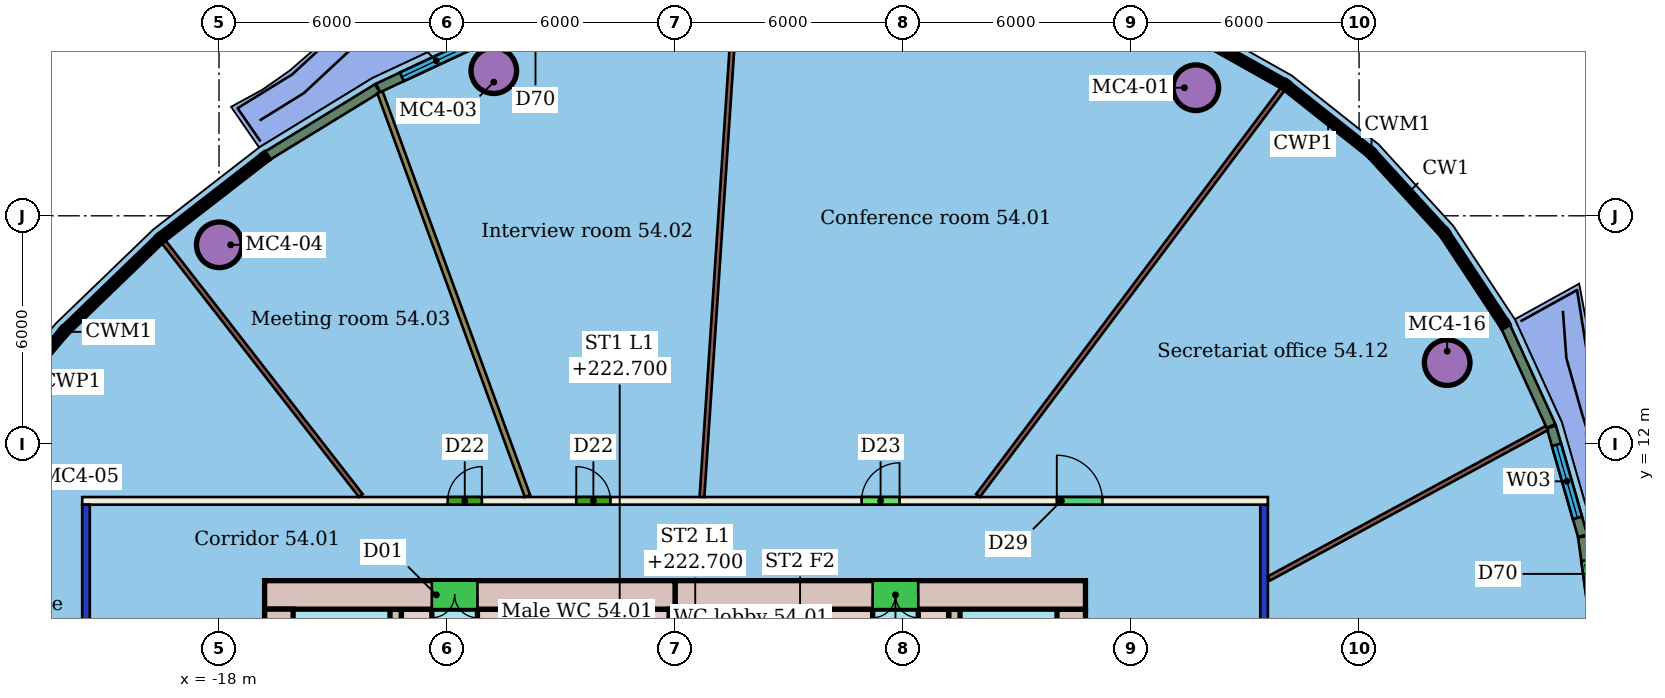
"""IFC4 building model, lengths in metres.
Left out: names, types, materials, properties, quantities, classifications, styles, units other than length and angle.
Written with IfcOpenShell. Run it as: python <this file> out.ifc"""

import sys

from ifc_helpers import new_model, si_unit, direction, frame, frame_2d, origin, origin_2d, place, context, subcontext, project, spatial, rectangle, hollow_circle, extrude, element, fill, save


model = new_model("IFC4")
c1 = context("Model", 3, precision=1e-05, world=origin(), true_north=direction((0.0, 1.0)))
c2 = subcontext(c1, "Body", "Model", "MODEL_VIEW")
j1 = project(units=[si_unit("LENGTHUNIT", "METRE"), si_unit("PLANEANGLEUNIT", "RADIAN")], contexts=[c1])
p1 = place(None, origin())
s1 = spatial("IfcSite", under=j1, at=p1, CompositionType="ELEMENT")
p2 = place(p1, origin())
s2 = spatial("IfcBuilding", under=s1, at=p2, CompositionType="ELEMENT")
p3 = place(p2, frame((0.0, 0.0, 220.9)))
s3 = spatial("IfcBuildingStorey", under=s2, at=p3, CompositionType="ELEMENT", Elevation=220.9)
for number, where, z_axis, x_axis in (
    (1, (7.704, 21.37, 0.0), (0.0, 0.0, 1.0), (1.0, 0.0, 0.0)),
    (2, (-10.769, 21.819, 0.0), (0.0, 0.0, 1.0), (1.0, 0.0, 0.0)),
    (3, (-17.993, 17.237, 0.0), (0.0, 0.0, 1.0), (1.0, 0.0, 0.0)),
    (4, (14.318, 14.137, 0.0), (0.0, 0.0, 1.0), (1.0, 0.0, 0.0)),
):
    element("IfcColumn", number, at=place(p3, frame(where, z_axis=z_axis, x_axis=x_axis)), inside=s3, PredefinedType="COLUMN", context=c2, shape_type="SweptSolid", body=[
        extrude(hollow_circle(Radius=0.6, WallThickness=0.045, at=origin_2d()), origin(), (0.0, 0.0, 1.0), 3.45),
    ])
p4 = place(p3, frame((-21.5, -10.4, 0.0), z_axis=(0.0, 0.0, 1.0), x_axis=(0.0, 1.0, 0.0)))
e5 = element("IfcWall", 5, at=p4, inside=s3, PredefinedType="PARTITIONING", context=c2, shape_type="SweptSolid", body=[
    extrude(rectangle(XDim=20.8, YDim=0.2, at=frame_2d((10.4, 0.0))), origin(), (0.0, 0.0, 1.0), 3.05),
])
p5 = place(p4, frame((13.413, 0.0, 0.0)))
e6 = element("IfcOpeningElement", 6, at=p5, cuts=e5, PredefinedType="OPENING", context=c2, shape_type="SweptSolid", body=[
    extrude(rectangle(XDim=1.0, YDim=2.4, at=frame_2d((0.5, 1.2))), frame((0.0, 0.11, 0.0), z_axis=(0.0, -1.0, 0.0), x_axis=(1.0, 0.0, 0.0)), (0.0, 0.0, 1.0), 0.22),
])
p6 = place(p4, frame((5.693, 0.0, 0.0)))
e7 = element("IfcOpeningElement", 7, at=p6, cuts=e5, PredefinedType="OPENING", context=c2, shape_type="SweptSolid", body=[
    extrude(rectangle(XDim=1.8, YDim=2.4, at=frame_2d((0.9, 1.2))), frame((0.0, 0.11, 0.0), z_axis=(0.0, -1.0, 0.0), x_axis=(1.0, 0.0, 0.0)), (0.0, 0.0, 1.0), 0.22),
])
p7 = place(p3, frame((-21.6, 10.5, 0.0), z_axis=(0.0, 0.0, 1.0), x_axis=(1.0, 0.0, 0.0)))
e8 = element("IfcWall", 8, at=p7, inside=s3, PredefinedType="PARTITIONING", context=c2, shape_type="SweptSolid", body=[
    extrude(rectangle(XDim=31.2, YDim=0.2, at=frame_2d((15.6, 0.0))), origin(), (0.0, 0.0, 1.0), 3.45),
])
p8 = place(p7, frame((20.509, 0.0, 0.0)))
e9 = element("IfcOpeningElement", 9, at=p8, cuts=e8, PredefinedType="OPENING", context=c2, shape_type="SweptSolid", body=[
    extrude(rectangle(XDim=1.0, YDim=2.4, at=frame_2d((0.5, 1.2))), frame((0.0, 0.11, 0.0), z_axis=(0.0, -1.0, 0.0), x_axis=(1.0, 0.0, 0.0)), (0.0, 0.0, 1.0), 0.22),
])
p9 = place(p7, frame((13.001, 0.0, 0.0)))
e10 = element("IfcOpeningElement", 10, at=p9, cuts=e8, PredefinedType="OPENING", context=c2, shape_type="SweptSolid", body=[
    extrude(rectangle(XDim=0.9, YDim=2.1, at=frame_2d((0.45, 1.05))), frame((0.0, 0.11, 0.0), z_axis=(0.0, -1.0, 0.0), x_axis=(1.0, 0.0, 0.0)), (0.0, 0.0, 1.0), 0.22),
])
p10 = place(p7, frame((9.617, 0.0, 0.0)))
e11 = element("IfcOpeningElement", 11, at=p10, cuts=e8, PredefinedType="OPENING", context=c2, shape_type="SweptSolid", body=[
    extrude(rectangle(XDim=0.9, YDim=2.1, at=frame_2d((0.45, 1.05))), frame((0.0, 0.11, 0.0), z_axis=(0.0, -1.0, 0.0), x_axis=(1.0, 0.0, 0.0)), (0.0, 0.0, 1.0), 0.22),
])
p11 = place(p7, frame((25.646, 0.0, 0.0)))
e12 = element("IfcOpeningElement", 12, at=p11, cuts=e8, PredefinedType="OPENING", context=c2, shape_type="SweptSolid", body=[
    extrude(rectangle(XDim=1.2, YDim=2.4, at=frame_2d((0.6, 1.2))), frame((0.0, 0.11, 0.0), z_axis=(0.0, -1.0, 0.0), x_axis=(1.0, 0.0, 0.0)), (0.0, 0.0, 1.0), 0.22),
])
p12 = place(p3, frame((9.5, 10.4, 0.0), z_axis=(0.0, 0.0, 1.0), x_axis=(0.0, -1.0, 0.0)))
e13 = element("IfcWall", 13, at=p12, inside=s3, PredefinedType="PARTITIONING", context=c2, shape_type="SweptSolid", body=[
    extrude(rectangle(XDim=20.8, YDim=0.2, at=frame_2d((10.4, 0.0))), origin(), (0.0, 0.0, 1.0), 3.05),
])
p13 = place(p12, frame((14.609, 0.0, 0.0)))
e14 = element("IfcOpeningElement", 14, at=p13, cuts=e13, PredefinedType="OPENING", context=c2, shape_type="SweptSolid", body=[
    extrude(rectangle(XDim=0.9, YDim=2.1, at=frame_2d((0.45, 1.05))), frame((0.0, 0.11, 0.0), z_axis=(0.0, -1.0, 0.0), x_axis=(1.0, 0.0, 0.0)), (0.0, 0.0, 1.0), 0.22),
])
p14 = place(p12, frame((6.585, 0.0, 0.0)))
e15 = element("IfcOpeningElement", 15, at=p14, cuts=e13, PredefinedType="OPENING", context=c2, shape_type="SweptSolid", body=[
    extrude(rectangle(XDim=1.5, YDim=2.1, at=frame_2d((0.75, 1.05))), frame((0.0, 0.11, 0.0), z_axis=(0.0, -1.0, 0.0), x_axis=(1.0, 0.0, 0.0)), (0.0, 0.0, 1.0), 0.22),
])
p15 = place(p3, frame((9.991, 21.337, 0.0), z_axis=(0.0, 0.0, 1.0), x_axis=(-0.599716591432, -0.800212478009, 0.0)))
e16 = element("IfcWall", 16, at=p15, inside=s3, PredefinedType="PARTITIONING", context=c2, shape_type="SweptSolid", body=[
    extrude(rectangle(XDim=13.371, YDim=0.125, at=frame_2d((6.686, 0.0))), origin(), (0.0, 0.0, 1.0), 3.45),
])
p16 = place(p3, frame((-4.372, 24.363, 0.0), z_axis=(0.0, 0.0, 1.0), x_axis=(-0.066675295354, -0.997774726574, 0.0)))
e17 = element("IfcWall", 17, at=p16, inside=s3, PredefinedType="PARTITIONING", context=c2, shape_type="SweptSolid", body=[
    extrude(rectangle(XDim=13.79, YDim=0.125, at=frame_2d((6.895, 0.0))), origin(), (0.0, 0.0, 1.0), 3.45),
])
p17 = place(p3, frame((-13.765, 21.249, 0.0), z_axis=(0.0, 0.0, 1.0), x_axis=(0.34323140515, -0.939250873046, 0.0)))
e18 = element("IfcWall", 18, at=p17, inside=s3, PredefinedType="PARTITIONING", context=c2, shape_type="SweptSolid", body=[
    extrude(rectangle(XDim=11.31, YDim=0.15, at=frame_2d((5.655, 0.0))), origin(), (0.0, 0.0, 1.0), 3.45),
])
p18 = place(p3, frame((-19.457, 17.314, 0.0), z_axis=(0.0, 0.0, 1.0), x_axis=(0.613674696521, -0.789558969837, 0.0)))
e19 = element("IfcWall", 19, at=p18, inside=s3, PredefinedType="PARTITIONING", context=c2, shape_type="SweptSolid", body=[
    extrude(rectangle(XDim=8.455, YDim=0.125, at=frame_2d((4.228, 0.0))), origin(), (0.0, 0.0, 1.0), 3.45),
])
p19 = place(p3, frame((16.939, 12.415, 0.0), z_axis=(0.0, 0.0, 1.0), x_axis=(-0.879463626067, -0.47596610218, 0.0)))
e20 = element("IfcWall", 20, at=p19, inside=s3, PredefinedType="PARTITIONING", context=c2, shape_type="SweptSolid", body=[
    extrude(rectangle(XDim=8.311, YDim=0.125, at=frame_2d((4.156, 0.0))), origin(), (0.0, 0.0, 1.0), 3.45),
])
p20 = place(p3, frame((-10.751, 22.794, 0.0), z_axis=(0.0, 0.0, 1.0), x_axis=(-0.906026245015, -0.42322150624, 0.0)))
e21 = element("IfcWall", 21, at=p20, inside=s3, PredefinedType="SOLIDWALL", context=c2, shape_type="SweptSolid", body=[
    extrude(rectangle(XDim=3.38, YDim=0.25, at=frame_2d((1.69, 0.0))), origin(), (0.0, 0.0, 1.0), 3.1),
])
p21 = place(p20, frame((0.69, 0.0, 0.9)))
e22 = element("IfcOpeningElement", 22, at=p21, cuts=e21, PredefinedType="OPENING", context=c2, shape_type="SweptSolid", body=[
    extrude(rectangle(XDim=2.0, YDim=2.1, at=frame_2d((1.0, 1.05))), frame((0.0, 0.135, 0.0), z_axis=(0.0, -1.0, 0.0), x_axis=(1.0, 0.0, 0.0)), (0.0, 0.0, 1.0), 0.27),
])
p22 = place(p3, frame((-13.833, 21.353, 0.0), z_axis=(0.0, 0.0, 1.0), x_axis=(-0.852681900505, -0.522430451402, 0.0)))
e23 = element("IfcWall", 23, at=p22, inside=s3, PredefinedType="SOLIDWALL", context=c2, shape_type="SweptSolid", body=[
    extrude(rectangle(XDim=3.393, YDim=0.25, at=frame_2d((1.697, 0.0))), origin(), (0.0, 0.0, 1.0), 3.1),
])
p23 = place(p3, frame((18.303, 6.529, 0.0), z_axis=(0.0, 0.0, 1.0), x_axis=(-0.136556327804, 0.99063230784, 0.0)))
e24 = element("IfcWall", 24, at=p23, inside=s3, PredefinedType="SOLIDWALL", context=c2, shape_type="SweptSolid", body=[
    extrude(rectangle(XDim=3.057, YDim=0.25, at=frame_2d((1.529, 0.0))), origin(), (0.0, 0.0, 1.0), 3.1),
])
p24 = place(p23, frame((0.628, 0.0, 0.0)))
e25 = element("IfcOpeningElement", 25, at=p24, cuts=e24, PredefinedType="OPENING", context=c2, shape_type="SweptSolid", body=[
    extrude(rectangle(XDim=1.8, YDim=2.4, at=frame_2d((0.9, 1.2))), frame((0.0, 0.135, 0.0), z_axis=(0.0, -1.0, 0.0), x_axis=(1.0, 0.0, 0.0)), (0.0, 0.0, 1.0), 0.27),
])
p25 = place(p3, frame((17.881, 9.583, 0.0), z_axis=(0.0, 0.0, 1.0), x_axis=(-0.275630564499, 0.961263643292, 0.0)))
e26 = element("IfcWall", 26, at=p25, inside=s3, PredefinedType="SOLIDWALL", context=c2, shape_type="SweptSolid", body=[
    extrude(rectangle(XDim=2.978, YDim=0.25, at=frame_2d((1.489, 0.0))), origin(), (0.0, 0.0, 1.0), 3.1),
])
p26 = place(p25, frame((0.489, 0.0, 0.9)))
e27 = element("IfcOpeningElement", 27, at=p26, cuts=e26, PredefinedType="OPENING", context=c2, shape_type="SweptSolid", body=[
    extrude(rectangle(XDim=2.0, YDim=2.1, at=frame_2d((1.0, 1.05))), frame((0.0, 0.135, 0.0), z_axis=(0.0, -1.0, 0.0), x_axis=(1.0, 0.0, 0.0)), (0.0, 0.0, 1.0), 0.27),
])
p27 = place(p3, frame((17.051, 12.47, 0.0), z_axis=(0.0, 0.0, 1.0), x_axis=(-0.41529540963, 0.909686606882, 0.0)))
e28 = element("IfcWall", 28, at=p27, inside=s3, PredefinedType="SOLIDWALL", context=c2, shape_type="SweptSolid", body=[
    extrude(rectangle(XDim=2.871, YDim=0.25, at=frame_2d((1.435, 0.0))), origin(), (0.0, 0.0, 1.0), 3.1),
])
p28 = place(p3, frame((4.8, 8.025, 0.0), z_axis=(0.0, 0.0, 1.0), x_axis=(-1.0, 0.0, 0.0)))
e29 = element("IfcWall", 29, at=p28, inside=s3, PredefinedType="SHEAR", context=c2, shape_type="SweptSolid", body=[
    extrude(rectangle(XDim=10.8, YDim=0.75, at=frame_2d((5.4, 0.0))), origin(), (0.0, 0.0, 1.0), 3.3),
])
p29 = place(p28, frame((4.4, 0.0, 0.0)))
e30 = element("IfcOpeningElement", 30, at=p29, cuts=e29, PredefinedType="OPENING", context=c2, shape_type="SweptSolid", body=[
    extrude(rectangle(XDim=1.2, YDim=2.1, at=frame_2d((0.6, 1.05))), frame((0.0, 0.385, 0.0), z_axis=(0.0, -1.0, 0.0), x_axis=(1.0, 0.0, 0.0)), (0.0, 0.0, 1.0), 0.77),
])
p30 = place(p3, frame((-6.0, 8.025, 0.0), z_axis=(0.0, 0.0, 1.0), x_axis=(-1.0, 0.0, 0.0)))
e31 = element("IfcWall", 31, at=p30, inside=s3, PredefinedType="SHEAR", context=c2, shape_type="SweptSolid", body=[
    extrude(rectangle(XDim=10.8, YDim=0.75, at=frame_2d((5.4, 0.0))), origin(), (0.0, 0.0, 1.0), 3.3),
])
p31 = place(p30, frame((5.2, 0.0, 0.0)))
e32 = element("IfcOpeningElement", 32, at=p31, cuts=e31, PredefinedType="OPENING", context=c2, shape_type="SweptSolid", body=[
    extrude(rectangle(XDim=1.2, YDim=2.1, at=frame_2d((0.6, 1.05))), frame((0.0, 0.385, 0.0), z_axis=(0.0, -1.0, 0.0), x_axis=(1.0, 0.0, 0.0)), (0.0, 0.0, 1.0), 0.77),
])
p32 = place(p3, frame((-16.425, 7.65, 0.0), z_axis=(0.0, 0.0, 1.0), x_axis=(0.0, -1.0, 0.0)))
e33 = element("IfcWall", 33, at=p32, inside=s3, PredefinedType="SHEAR", context=c2, shape_type="SweptSolid", body=[
    extrude(rectangle(XDim=15.3, YDim=0.75, at=frame_2d((7.65, 0.0))), origin(), (0.0, 0.0, 1.0), 3.3),
])
p33 = place(p32, frame((11.25, 0.0, 0.0)))
e34 = element("IfcOpeningElement", 34, at=p33, cuts=e33, PredefinedType="OPENING", context=c2, shape_type="SweptSolid", body=[
    extrude(rectangle(XDim=1.2, YDim=2.1, at=frame_2d((0.6, 1.05))), frame((0.0, 0.385, 0.0), z_axis=(0.0, -1.0, 0.0), x_axis=(1.0, 0.0, 0.0)), (0.0, 0.0, 1.0), 0.77),
])
p34 = place(p32, frame((2.85, 0.0, 0.0)))
e35 = element("IfcOpeningElement", 35, at=p34, cuts=e33, PredefinedType="OPENING", context=c2, shape_type="SweptSolid", body=[
    extrude(rectangle(XDim=1.2, YDim=2.1, at=frame_2d((0.6, 1.05))), frame((0.0, 0.385, 0.0), z_axis=(0.0, -1.0, 0.0), x_axis=(1.0, 0.0, 0.0)), (0.0, 0.0, 1.0), 0.77),
])
p35 = place(p3, frame((4.425, -7.65, 0.0), z_axis=(0.0, 0.0, 1.0), x_axis=(0.0, 1.0, 0.0)))
e36 = element("IfcWall", 36, at=p35, inside=s3, PredefinedType="SHEAR", context=c2, shape_type="SweptSolid", body=[
    extrude(rectangle(XDim=15.3, YDim=0.75, at=frame_2d((7.65, 0.0))), origin(), (0.0, 0.0, 1.0), 3.3),
])
p36 = place(p35, frame((2.85, 0.0, 0.0)))
e37 = element("IfcOpeningElement", 37, at=p36, cuts=e36, PredefinedType="OPENING", context=c2, shape_type="SweptSolid", body=[
    extrude(rectangle(XDim=1.2, YDim=2.1, at=frame_2d((0.6, 1.05))), frame((0.0, 0.385, 0.0), z_axis=(0.0, -1.0, 0.0), x_axis=(1.0, 0.0, 0.0)), (0.0, 0.0, 1.0), 0.77),
])
p37 = place(p35, frame((11.25, 0.0, 0.0)))
e38 = element("IfcOpeningElement", 38, at=p37, cuts=e36, PredefinedType="OPENING", context=c2, shape_type="SweptSolid", body=[
    extrude(rectangle(XDim=1.2, YDim=2.1, at=frame_2d((0.6, 1.05))), frame((0.0, 0.385, 0.0), z_axis=(0.0, -1.0, 0.0), x_axis=(1.0, 0.0, 0.0)), (0.0, 0.0, 1.0), 0.77),
])
p38 = place(p3, frame((-13.35, 7.65, 0.0), z_axis=(0.0, 0.0, 1.0), x_axis=(0.0, -1.0, 0.0)))
e39 = element("IfcWall", 39, at=p38, inside=s3, PredefinedType="SHEAR", context=c2, shape_type="SweptSolid", body=[
    extrude(rectangle(XDim=15.3, YDim=0.3, at=frame_2d((7.65, 0.0))), origin(), (0.0, 0.0, 1.0), 3.3),
])
p39 = place(p38, frame((6.9, 0.0, 0.0)))
e40 = element("IfcOpeningElement", 40, at=p39, cuts=e39, PredefinedType="OPENING", context=c2, shape_type="SweptSolid", body=[
    extrude(rectangle(XDim=1.5, YDim=2.1, at=frame_2d((0.75, 1.05))), frame((0.0, 0.16, 0.0), z_axis=(0.0, -1.0, 0.0), x_axis=(1.0, 0.0, 0.0)), (0.0, 0.0, 1.0), 0.32),
])
p40 = place(p3, frame((1.35, -7.65, 0.0), z_axis=(0.0, 0.0, 1.0), x_axis=(0.0, 1.0, 0.0)))
e41 = element("IfcWall", 41, at=p40, inside=s3, PredefinedType="SHEAR", context=c2, shape_type="SweptSolid", body=[
    extrude(rectangle(XDim=15.3, YDim=0.3, at=frame_2d((7.65, 0.0))), origin(), (0.0, 0.0, 1.0), 3.3),
])
p41 = place(p40, frame((1.56, 0.0, 0.0)))
e42 = element("IfcOpeningElement", 42, at=p41, cuts=e41, PredefinedType="OPENING", context=c2, shape_type="SweptSolid", body=[
    extrude(rectangle(XDim=1.0, YDim=2.1, at=frame_2d((0.5, 1.05))), frame((0.0, 0.16, 0.0), z_axis=(0.0, -1.0, 0.0), x_axis=(1.0, 0.0, 0.0)), (0.0, 0.0, 1.0), 0.32),
])
p42 = place(p40, frame((6.9, 0.0, 0.0)))
e43 = element("IfcOpeningElement", 43, at=p42, cuts=e41, PredefinedType="OPENING", context=c2, shape_type="SweptSolid", body=[
    extrude(rectangle(XDim=1.5, YDim=2.1, at=frame_2d((0.75, 1.05))), frame((0.0, 0.16, 0.0), z_axis=(0.0, -1.0, 0.0), x_axis=(1.0, 0.0, 0.0)), (0.0, 0.0, 1.0), 0.32),
])
p43 = place(p3, frame((-6.0, 3.88, 0.0), z_axis=(0.0, 0.0, 1.0), x_axis=(0.0, 1.0, 0.0)))
e44 = element("IfcWall", 44, at=p43, inside=s3, PredefinedType="SHEAR", context=c2, shape_type="SweptSolid", body=[
    extrude(rectangle(XDim=3.77, YDim=0.3, at=frame_2d((1.885, 0.0))), origin(), (0.0, 0.0, 1.0), 3.3),
])
p44 = place(p3, frame((-13.2, 7.475, 0.0), z_axis=(0.0, 0.0, 1.0), x_axis=(1.0, 0.0, 0.0)))
e45 = element("IfcWall", 45, at=p44, inside=s3, PredefinedType="SHEAR", context=c2, shape_type="SweptSolid", body=[
    extrude(rectangle(XDim=0.8, YDim=0.35, at=frame_2d((0.4, 0.0))), origin(), (0.0, 0.0, 1.0), 3.3),
])
for number, where, z_axis, x_axis in (
    (46, (-11.2, 7.475, 0.0), (0.0, 0.0, 1.0), (1.0, 0.0, 0.0)),
    (47, (-5.85, 7.475, 0.0), (0.0, 0.0, 1.0), (1.0, 0.0, 0.0)),
):
    element("IfcWall", number, at=place(p3, frame(where, z_axis=z_axis, x_axis=x_axis)), inside=s3, PredefinedType="SHEAR", context=c2, shape_type="SweptSolid", body=[
        extrude(rectangle(XDim=5.05, YDim=0.35, at=frame_2d((2.525, 0.0))), origin(), (0.0, 0.0, 1.0), 3.3),
    ])
p45 = place(p3, frame((0.4, 7.475, 0.0), z_axis=(0.0, 0.0, 1.0), x_axis=(1.0, 0.0, 0.0)))
e48 = element("IfcWall", 48, at=p45, inside=s3, PredefinedType="SHEAR", context=c2, shape_type="SweptSolid", body=[
    extrude(rectangle(XDim=0.8, YDim=0.35, at=frame_2d((0.4, 0.0))), origin(), (0.0, 0.0, 1.0), 3.3),
])
p46 = place(p8, origin())
e49 = element("IfcDoor", 49, at=p46, inside=s3, OperationType="SINGLE_SWING_RIGHT", PredefinedType="DOOR", context=c2, shape_type="SweptSolid", body=[
    extrude(rectangle(XDim=1.0, YDim=2.4, at=frame_2d((0.5, 1.2))), frame((0.0, 0.025, 0.0), z_axis=(0.0, -1.0, 0.0), x_axis=(1.0, 0.0, 0.0)), (0.0, 0.0, 1.0), 0.05),
])
fill(e9, e49)
p47 = place(p9, origin())
e50 = element("IfcDoor", 50, at=p47, inside=s3, OperationType="SINGLE_SWING_LEFT", PredefinedType="DOOR", context=c2, shape_type="SweptSolid", body=[
    extrude(rectangle(XDim=0.9, YDim=2.1, at=frame_2d((0.45, 1.05))), frame((0.0, 0.025, 0.0), z_axis=(0.0, -1.0, 0.0), x_axis=(1.0, 0.0, 0.0)), (0.0, 0.0, 1.0), 0.05),
])
fill(e10, e50)
p48 = place(p10, origin())
e51 = element("IfcDoor", 51, at=p48, inside=s3, OperationType="SINGLE_SWING_RIGHT", PredefinedType="DOOR", context=c2, shape_type="SweptSolid", body=[
    extrude(rectangle(XDim=0.9, YDim=2.1, at=frame_2d((0.45, 1.05))), frame((0.0, 0.025, 0.0), z_axis=(0.0, -1.0, 0.0), x_axis=(1.0, 0.0, 0.0)), (0.0, 0.0, 1.0), 0.05),
])
fill(e11, e51)
p49 = place(p11, origin())
e52 = element("IfcDoor", 52, at=p49, inside=s3, OperationType="SINGLE_SWING_LEFT", PredefinedType="DOOR", context=c2, shape_type="SweptSolid", body=[
    extrude(rectangle(XDim=1.2, YDim=2.4, at=frame_2d((0.6, 1.2))), frame((0.0, 0.025, 0.0), z_axis=(0.0, -1.0, 0.0), x_axis=(1.0, 0.0, 0.0)), (0.0, 0.0, 1.0), 0.05),
])
fill(e12, e52)
p50 = place(p21, origin())
e53 = element("IfcWindow", 53, at=p50, inside=s3, PartitioningType="SINGLE_PANEL", PredefinedType="WINDOW", context=c2, shape_type="SweptSolid", body=[
    extrude(rectangle(XDim=2.0, YDim=2.1, at=frame_2d((1.0, 1.05))), frame((0.0, 0.03, 0.0), z_axis=(0.0, -1.0, 0.0), x_axis=(1.0, 0.0, 0.0)), (0.0, 0.0, 1.0), 0.06),
])
fill(e22, e53)
p51 = place(p26, origin())
e54 = element("IfcWindow", 54, at=p51, inside=s3, PartitioningType="SINGLE_PANEL", PredefinedType="WINDOW", context=c2, shape_type="SweptSolid", body=[
    extrude(rectangle(XDim=2.0, YDim=2.1, at=frame_2d((1.0, 1.05))), frame((0.0, 0.03, 0.0), z_axis=(0.0, -1.0, 0.0), x_axis=(1.0, 0.0, 0.0)), (0.0, 0.0, 1.0), 0.06),
])
fill(e27, e54)
p52 = place(p29, origin())
e55 = element("IfcDoor", 55, at=p52, inside=s3, OperationType="DOUBLE_DOOR_SINGLE_SWING", PredefinedType="NOTDEFINED", context=c2, shape_type="SweptSolid", body=[
    extrude(rectangle(XDim=1.2, YDim=2.1, at=frame_2d((0.6, 1.05))), frame((0.0, 0.025, 0.0), z_axis=(0.0, -1.0, 0.0), x_axis=(1.0, 0.0, 0.0)), (0.0, 0.0, 1.0), 0.05),
])
fill(e30, e55)
p53 = place(p31, origin())
e56 = element("IfcDoor", 56, at=p53, inside=s3, OperationType="DOUBLE_DOOR_SINGLE_SWING", PredefinedType="NOTDEFINED", context=c2, shape_type="SweptSolid", body=[
    extrude(rectangle(XDim=1.2, YDim=2.1, at=frame_2d((0.6, 1.05))), frame((0.0, 0.025, 0.0), z_axis=(0.0, -1.0, 0.0), x_axis=(1.0, 0.0, 0.0)), (0.0, 0.0, 1.0), 0.05),
])
fill(e32, e56)
save(model, sys.argv[1])
